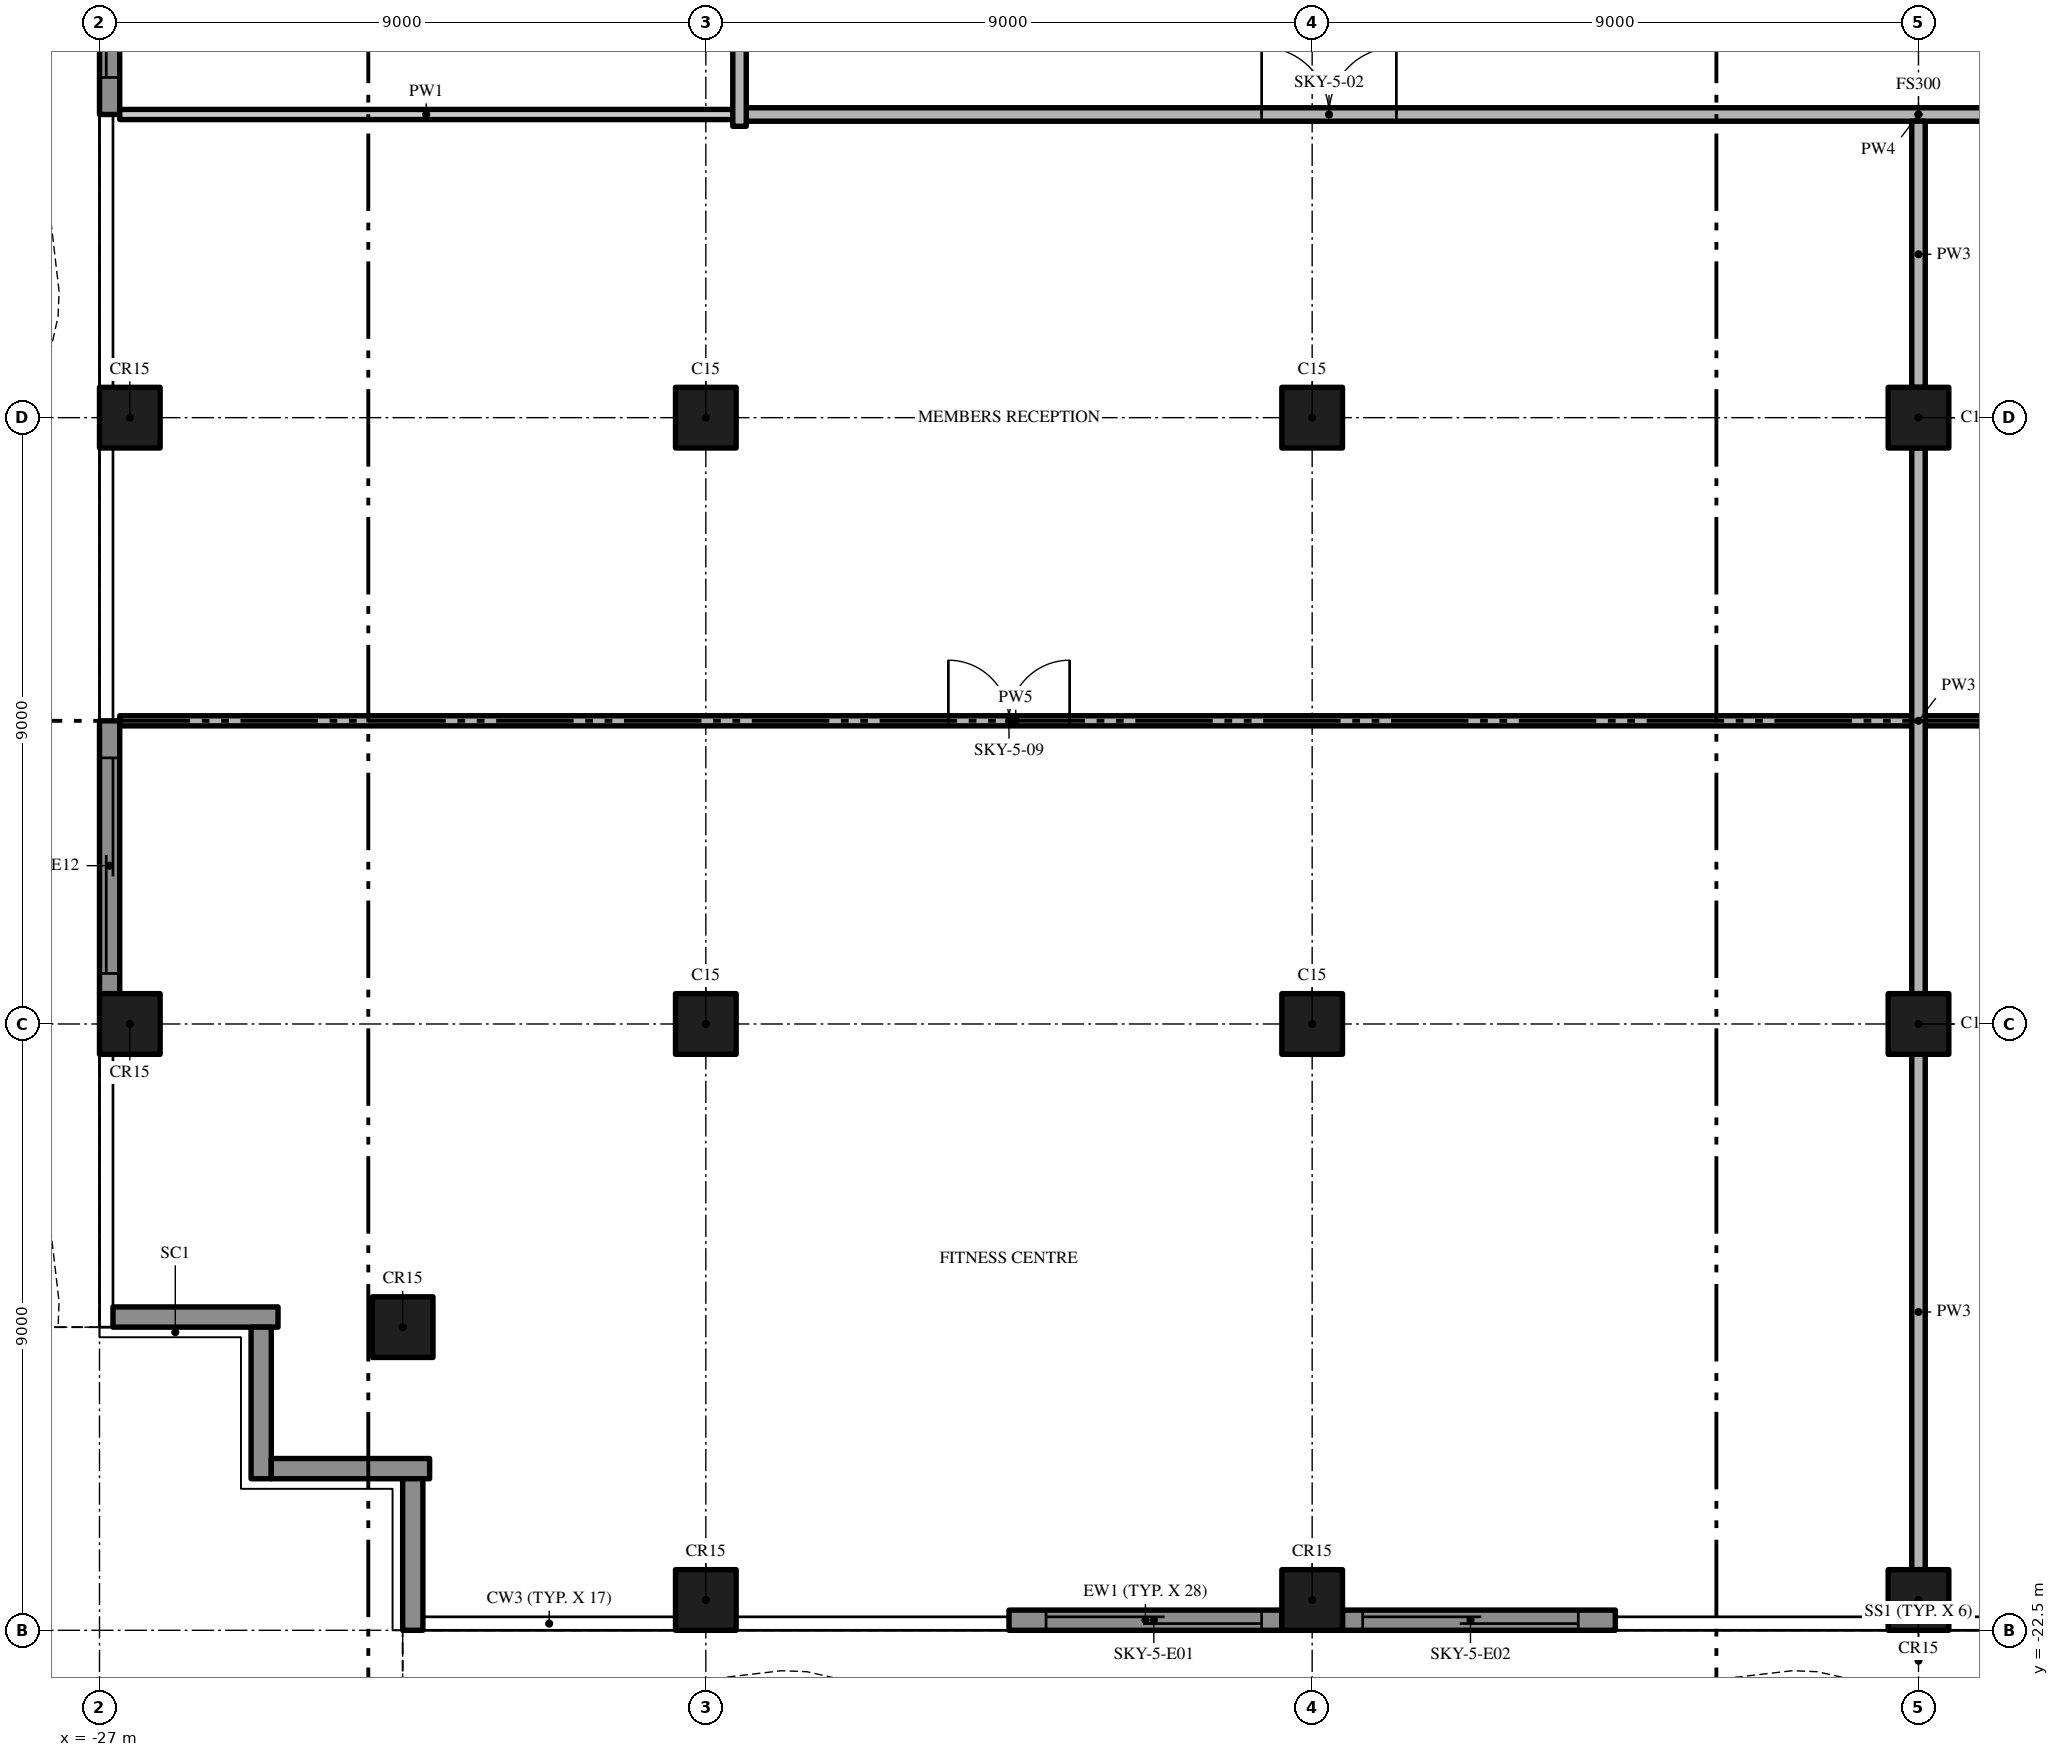
"""IFC4 building model, lengths in metres.
Left out: names, types, materials, properties, quantities, classifications, styles, units other than length and angle.
Written with IfcOpenShell. Run it as: python <this file> out.ifc"""

import sys

from ifc_helpers import new_model, si_unit, direction, frame, frame_2d, origin, origin_2d, place, context, subcontext, project, spatial, polyline, rectangle, outline, extrude, element, fill, save


model = new_model("IFC4")
c1 = context("Model", 3, precision=1e-05, world=origin(), true_north=direction((0.0, 1.0)))
c2 = subcontext(c1, "Body", "Model", "MODEL_VIEW")
j1 = project(units=[si_unit("LENGTHUNIT", "METRE"), si_unit("PLANEANGLEUNIT", "RADIAN")], contexts=[c1])
p1 = place(None, origin())
s1 = spatial("IfcSite", under=j1, at=p1, CompositionType="ELEMENT")
p2 = place(p1, origin())
s2 = spatial("IfcBuilding", under=s1, at=p2, CompositionType="ELEMENT")
p3 = place(p2, frame((0.0, 0.0, 284.4)))
s3 = spatial("IfcBuildingStorey", under=s2, at=p3, CompositionType="ELEMENT", Elevation=284.4)
for number, where, z_axis, x_axis in (
    (1, (-18.0, -13.5, 0.0), (0.0, 0.0, 1.0), (1.0, 0.0, 0.0)),
    (2, (-18.0, -22.05, 0.0), (0.0, 0.0, 1.0), (1.0, 0.0, 0.0)),
    (3, (-18.0, -4.5, 0.0), (0.0, 0.0, 1.0), (1.0, 0.0, 0.0)),
    (4, (-26.55, -13.5, 0.0), (0.0, 0.0, 1.0), (1.0, 0.0, 0.0)),
    (5, (-22.5, -18.0, 0.0), (0.0, 0.0, 1.0), (1.0, 0.0, 0.0)),
    (6, (-26.55, -4.5, 0.0), (0.0, 0.0, 1.0), (1.0, 0.0, 0.0)),
    (7, (-9.0, -13.5, 0.0), (0.0, 0.0, 1.0), (1.0, 0.0, 0.0)),
    (8, (-9.0, -22.05, 0.0), (0.0, 0.0, 1.0), (1.0, 0.0, 0.0)),
    (9, (-9.0, -4.5, 0.0), (0.0, 0.0, 1.0), (1.0, 0.0, 0.0)),
    (10, (0.0, -13.5, 0.0), (0.0, 0.0, 1.0), (1.0, 0.0, 0.0)),
    (11, (0.0, -22.05, 0.0), (0.0, 0.0, 1.0), (1.0, 0.0, 0.0)),
    (12, (0.0, -4.5, 0.0), (0.0, 0.0, 1.0), (1.0, 0.0, 0.0)),
):
    element("IfcColumn", number, at=place(p3, frame(where, z_axis=z_axis, x_axis=x_axis)), inside=s3, PredefinedType="COLUMN", context=c2, shape_type="SweptSolid", body=[
        extrude(rectangle(XDim=0.9, YDim=0.9, at=origin_2d()), origin(), (0.0, 0.0, 1.0), 4.7),
    ])
p4 = place(p3, frame((-9.45, -22.35, 0.0), z_axis=(0.0, 0.0, 1.0), x_axis=(-1.0, 0.0, 0.0)))
e13 = element("IfcWall", 13, at=p4, inside=s3, PredefinedType="SOLIDWALL", context=c2, shape_type="SweptSolid", body=[
    extrude(rectangle(XDim=4.05, YDim=0.3, at=frame_2d((2.025, 0.0))), origin(), (0.0, 0.0, 1.0), 4.7),
])
p5 = place(p4, frame((0.3, 0.0, 0.0)))
e14 = element("IfcOpeningElement", 14, at=p5, cuts=e13, PredefinedType="OPENING", context=c2, shape_type="SweptSolid", body=[
    extrude(rectangle(XDim=3.2, YDim=2.4, at=frame_2d((1.6, 1.2))), frame((0.0, 0.16, 0.0), z_axis=(0.0, -1.0, 0.0), x_axis=(1.0, 0.0, 0.0)), (0.0, 0.0, 1.0), 0.32),
])
p6 = place(p3, frame((-4.5, -22.35, 0.0), z_axis=(0.0, 0.0, 1.0), x_axis=(-1.0, 0.0, 0.0)))
e15 = element("IfcWall", 15, at=p6, inside=s3, PredefinedType="SOLIDWALL", context=c2, shape_type="SweptSolid", body=[
    extrude(rectangle(XDim=4.05, YDim=0.3, at=frame_2d((2.025, 0.0))), origin(), (0.0, 0.0, 1.0), 4.7),
])
p7 = place(p6, frame((0.55, 0.0, 0.0)))
e16 = element("IfcOpeningElement", 16, at=p7, cuts=e15, PredefinedType="OPENING", context=c2, shape_type="SweptSolid", body=[
    extrude(rectangle(XDim=3.2, YDim=2.4, at=frame_2d((1.6, 1.2))), frame((0.0, 0.16, 0.0), z_axis=(0.0, -1.0, 0.0), x_axis=(1.0, 0.0, 0.0)), (0.0, 0.0, 1.0), 0.32),
])
p8 = place(p3, frame((-26.85, 0.0, 0.0), z_axis=(0.0, 0.0, 1.0), x_axis=(0.0, 1.0, 0.0)))
e17 = element("IfcWall", 17, at=p8, inside=s3, PredefinedType="SOLIDWALL", context=c2, shape_type="SweptSolid", body=[
    extrude(rectangle(XDim=4.05, YDim=0.3, at=frame_2d((2.025, 0.0))), origin(), (0.0, 0.0, 1.0), 4.7),
])
p9 = place(p8, frame((0.55, 0.0, 0.0)))
e18 = element("IfcOpeningElement", 18, at=p9, cuts=e17, PredefinedType="OPENING", context=c2, shape_type="SweptSolid", body=[
    extrude(rectangle(XDim=3.2, YDim=2.4, at=frame_2d((1.6, 1.2))), frame((0.0, 0.16, 0.0), z_axis=(0.0, -1.0, 0.0), x_axis=(1.0, 0.0, 0.0)), (0.0, 0.0, 1.0), 0.32),
])
p10 = place(p3, frame((-26.85, -13.05, 0.0), z_axis=(0.0, 0.0, 1.0), x_axis=(0.0, 1.0, 0.0)))
e19 = element("IfcWall", 19, at=p10, inside=s3, PredefinedType="SOLIDWALL", context=c2, shape_type="SweptSolid", body=[
    extrude(rectangle(XDim=4.05, YDim=0.3, at=frame_2d((2.025, 0.0))), origin(), (0.0, 0.0, 1.0), 4.7),
])
p11 = place(p10, frame((0.3, 0.0, 0.0)))
e20 = element("IfcOpeningElement", 20, at=p11, cuts=e19, PredefinedType="OPENING", context=c2, shape_type="SweptSolid", body=[
    extrude(rectangle(XDim=3.2, YDim=2.4, at=frame_2d((1.6, 1.2))), frame((0.0, 0.16, 0.0), z_axis=(0.0, -1.0, 0.0), x_axis=(1.0, 0.0, 0.0)), (0.0, 0.0, 1.0), 0.32),
])
p12 = place(p3, frame((-24.35, -17.85, 0.0), z_axis=(0.0, 0.0, 1.0), x_axis=(-1.0, 0.0, 0.0)))
e21 = element("IfcWall", 21, at=p12, inside=s3, PredefinedType="SOLIDWALL", context=c2, shape_type="SweptSolid", body=[
    extrude(rectangle(XDim=2.45, YDim=0.3, at=frame_2d((1.225, 0.0))), origin(), (0.0, 0.0, 1.0), 4.7),
])
p13 = place(p3, frame((-24.6, -20.25, 0.0), z_axis=(0.0, 0.0, 1.0), x_axis=(0.0, 1.0, 0.0)))
e22 = element("IfcWall", 22, at=p13, inside=s3, PredefinedType="SOLIDWALL", context=c2, shape_type="SweptSolid", body=[
    extrude(rectangle(XDim=2.25, YDim=0.3, at=frame_2d((1.125, 0.0))), origin(), (0.0, 0.0, 1.0), 4.7),
])
p14 = place(p3, frame((-22.1, -20.1, 0.0), z_axis=(0.0, 0.0, 1.0), x_axis=(-1.0, 0.0, 0.0)))
e23 = element("IfcWall", 23, at=p14, inside=s3, PredefinedType="SOLIDWALL", context=c2, shape_type="SweptSolid", body=[
    extrude(rectangle(XDim=2.35, YDim=0.3, at=frame_2d((1.175, 0.0))), origin(), (0.0, 0.0, 1.0), 4.7),
])
p15 = place(p3, frame((-22.35, -22.5, 0.0), z_axis=(0.0, 0.0, 1.0), x_axis=(0.0, 1.0, 0.0)))
e24 = element("IfcWall", 24, at=p15, inside=s3, PredefinedType="SOLIDWALL", context=c2, shape_type="SweptSolid", body=[
    extrude(rectangle(XDim=2.25, YDim=0.3, at=frame_2d((1.125, 0.0))), origin(), (0.0, 0.0, 1.0), 4.7),
])
p16 = place(p3, origin())
e25 = element("IfcWall", 25, at=p16, inside=s3, PredefinedType="USERDEFINED", context=c2, shape_type="SweptSolid", body=[
    extrude(outline(polyline([(-22.5, -25.149), (-21.0, -24.488), (-19.5, -23.755), (-18.0, -23.231), (-16.875, -23.1), (-16.5, -23.115), (-15.0, -23.451), (-13.5, -24.112), (-12.0, -24.845), (-10.5, -25.369), (-9.375, -25.5), (-9.0, -25.485), (-7.5, -25.149), (-6.0, -24.488), (-4.5, -23.755), (-3.0, -23.231), (-1.875, -23.1), (-1.5, -23.115), (0.0, -23.451), (1.5, -24.112), (3.0, -24.845), (4.5, -25.369), (5.625, -25.5), (6.0, -25.485), (7.5, -25.149), (9.0, -24.488), (10.5, -23.755), (12.0, -23.231), (13.125, -23.1), (13.5, -23.115), (15.0, -23.451), (16.5, -24.112), (18.0, -24.845), (19.5, -25.369), (20.625, -25.5), (21.0, -25.485), (22.5, -25.149), (22.445, -24.905), (20.967, -25.236), (20.635, -25.249), (19.556, -25.124), (18.096, -24.614), (16.605, -23.885), (15.079, -23.213), (13.533, -22.866), (13.115, -22.849), (11.944, -22.986), (10.404, -23.524), (8.895, -24.261), (7.421, -24.91), (5.967, -25.236), (5.635, -25.249), (4.556, -25.124), (3.096, -24.614), (1.605, -23.885), (0.079, -23.213), (-1.467, -22.866), (-1.885, -22.849), (-3.056, -22.986), (-4.596, -23.524), (-6.105, -24.261), (-7.579, -24.91), (-9.033, -25.236), (-9.365, -25.249), (-10.444, -25.124), (-11.904, -24.614), (-13.395, -23.885), (-14.921, -23.213), (-16.467, -22.866), (-16.885, -22.849), (-18.056, -22.986), (-19.596, -23.524), (-21.105, -24.261), (-22.601, -24.92), (-22.5, -25.149)])), origin(), (0.0, 0.0, 1.0), 0.9),
])
p17 = place(p3, origin())
e26 = element("IfcWall", 26, at=p17, inside=s3, PredefinedType="USERDEFINED", context=c2, shape_type="SweptSolid", body=[
    extrude(outline(polyline([(-29.649, 18.0), (-28.988, 16.5), (-28.255, 15.0), (-27.731, 13.5), (-27.6, 12.375), (-27.615, 12.0), (-27.951, 10.5), (-28.612, 9.0), (-29.345, 7.5), (-29.869, 6.0), (-30.0, 4.875), (-29.985, 4.5), (-29.649, 3.0), (-28.988, 1.5), (-28.255, 0.0), (-27.731, -1.5), (-27.6, -2.625), (-27.615, -3.0), (-27.951, -4.5), (-28.612, -6.0), (-29.345, -7.5), (-29.869, -9.0), (-30.0, -10.125), (-29.985, -10.5), (-29.649, -12.0), (-28.988, -13.5), (-28.255, -15.0), (-27.731, -16.5), (-27.6, -17.625), (-27.615, -18.0), (-27.365, -18.01), (-27.349, -17.615), (-27.486, -16.444), (-28.024, -14.904), (-28.761, -13.395), (-29.41, -11.921), (-29.736, -10.467), (-29.749, -10.135), (-29.624, -9.056), (-29.114, -7.596), (-28.385, -6.105), (-27.713, -4.579), (-27.366, -3.033), (-27.349, -2.615), (-27.486, -1.444), (-28.024, 0.096), (-28.761, 1.605), (-29.41, 3.079), (-29.736, 4.533), (-29.749, 4.865), (-29.624, 5.944), (-29.114, 7.404), (-28.385, 8.895), (-27.713, 10.421), (-27.366, 11.967), (-27.349, 12.385), (-27.486, 13.556), (-28.024, 15.096), (-28.761, 16.605), (-29.42, 18.101), (-29.649, 18.0)])), origin(), (0.0, 0.0, 1.0), 0.9),
])
p18 = place(p3, frame((-26.7, -9.0, 0.0), z_axis=(0.0, 0.0, 1.0), x_axis=(1.0, 0.0, 0.0)))
e27 = element("IfcWall", 27, at=p18, inside=s3, PredefinedType="PARTITIONING", context=c2, shape_type="SweptSolid", body=[
    extrude(rectangle(XDim=26.6, YDim=0.15, at=frame_2d((13.3, 0.0))), origin(), (0.0, 0.0, 1.0), 4.7),
])
p19 = place(p18, frame((12.3, 0.0, 0.0)))
e28 = element("IfcOpeningElement", 28, at=p19, cuts=e27, PredefinedType="OPENING", context=c2, shape_type="SweptSolid", body=[
    extrude(rectangle(XDim=1.8, YDim=2.4, at=frame_2d((0.9, 1.2))), frame((0.0, 0.085, 0.0), z_axis=(0.0, -1.0, 0.0), x_axis=(1.0, 0.0, 0.0)), (0.0, 0.0, 1.0), 0.17),
])
p20 = place(p3, frame((0.1, -9.0, 0.0), z_axis=(0.0, 0.0, 1.0), x_axis=(1.0, 0.0, 0.0)))
e29 = element("IfcWall", 29, at=p20, inside=s3, PredefinedType="PARTITIONING", context=c2, shape_type="SweptSolid", body=[
    extrude(rectangle(XDim=26.6, YDim=0.15, at=frame_2d((13.3, 0.0))), origin(), (0.0, 0.0, 1.0), 4.7),
])
p21 = place(p20, frame((12.5, 0.0, 0.0)))
e30 = element("IfcOpeningElement", 30, at=p21, cuts=e29, PredefinedType="OPENING", context=c2, shape_type="SweptSolid", body=[
    extrude(rectangle(XDim=1.8, YDim=2.4, at=frame_2d((0.9, 1.2))), frame((0.0, 0.085, 0.0), z_axis=(0.0, -1.0, 0.0), x_axis=(1.0, 0.0, 0.0)), (0.0, 0.0, 1.0), 0.17),
])
p22 = place(p3, frame((-17.4, 0.0, 0.0), z_axis=(0.0, 0.0, 1.0), x_axis=(1.0, 0.0, 0.0)))
e31 = element("IfcWall", 31, at=p22, inside=s3, PredefinedType="PARTITIONING", context=c2, shape_type="SweptSolid", body=[
    extrude(rectangle(XDim=34.8, YDim=0.2, at=frame_2d((17.4, 0.0))), origin(), (0.0, 0.0, 1.0), 4.7),
])
p23 = place(p22, frame((7.65, 0.0, 0.0)))
e32 = element("IfcOpeningElement", 32, at=p23, cuts=e31, PredefinedType="OPENING", context=c2, shape_type="SweptSolid", body=[
    extrude(rectangle(XDim=2.0, YDim=2.4, at=frame_2d((1.0, 1.2))), frame((0.0, 0.11, 0.0), z_axis=(0.0, -1.0, 0.0), x_axis=(1.0, 0.0, 0.0)), (0.0, 0.0, 1.0), 0.22),
])
p24 = place(p22, frame((25.15, 0.0, 0.0)))
e33 = element("IfcOpeningElement", 33, at=p24, cuts=e31, PredefinedType="OPENING", context=c2, shape_type="SweptSolid", body=[
    extrude(rectangle(XDim=2.0, YDim=2.4, at=frame_2d((1.0, 1.2))), frame((0.0, 0.11, 0.0), z_axis=(0.0, -1.0, 0.0), x_axis=(1.0, 0.0, 0.0)), (0.0, 0.0, 1.0), 0.22),
])
p25 = place(p3, frame((-26.7, 0.0, 0.0), z_axis=(0.0, 0.0, 1.0), x_axis=(1.0, 0.0, 0.0)))
e34 = element("IfcWall", 34, at=p25, inside=s3, PredefinedType="PARTITIONING", context=c2, shape_type="SweptSolid", body=[
    extrude(rectangle(XDim=9.1, YDim=0.15, at=frame_2d((4.55, 0.0))), origin(), (0.0, 0.0, 1.0), 4.7),
])
p26 = place(p3, frame((-17.5, 4.05, 0.0), z_axis=(0.0, 0.0, 1.0), x_axis=(0.0, -1.0, 0.0)))
e35 = element("IfcWall", 35, at=p26, inside=s3, PredefinedType="PARTITIONING", context=c2, shape_type="SweptSolid", body=[
    extrude(rectangle(XDim=4.225, YDim=0.2, at=frame_2d((2.112, 0.0))), origin(), (0.0, 0.0, 1.0), 4.7),
])
p27 = place(p26, frame((0.9, 0.0, 0.0)))
e36 = element("IfcOpeningElement", 36, at=p27, cuts=e35, PredefinedType="OPENING", context=c2, shape_type="SweptSolid", body=[
    extrude(rectangle(XDim=1.8, YDim=2.4, at=frame_2d((0.9, 1.2))), frame((0.0, 0.11, 0.0), z_axis=(0.0, -1.0, 0.0), x_axis=(1.0, 0.0, 0.0)), (0.0, 0.0, 1.0), 0.22),
])
p28 = place(p3, frame((0.0, -21.6, 0.0), z_axis=(0.0, 0.0, 1.0), x_axis=(0.0, 1.0, 0.0)))
e37 = element("IfcWall", 37, at=p28, inside=s3, PredefinedType="PARTITIONING", context=c2, shape_type="SweptSolid", body=[
    extrude(rectangle(XDim=7.65, YDim=0.2, at=frame_2d((3.825, 0.0))), origin(), (0.0, 0.0, 1.0), 4.7),
])
p29 = place(p3, frame((0.0, -13.05, 0.0), z_axis=(0.0, 0.0, 1.0), x_axis=(0.0, 1.0, 0.0)))
e38 = element("IfcWall", 38, at=p29, inside=s3, PredefinedType="PARTITIONING", context=c2, shape_type="SweptSolid", body=[
    extrude(rectangle(XDim=8.1, YDim=0.2, at=frame_2d((4.05, 0.0))), origin(), (0.0, 0.0, 1.0), 4.7),
])
p30 = place(p3, frame((0.0, -4.05, 0.0), z_axis=(0.0, 0.0, 1.0), x_axis=(0.0, 1.0, 0.0)))
e39 = element("IfcWall", 39, at=p30, inside=s3, PredefinedType="PARTITIONING", context=c2, shape_type="SweptSolid", body=[
    extrude(rectangle(XDim=3.95, YDim=0.2, at=frame_2d((1.975, 0.0))), origin(), (0.0, 0.0, 1.0), 4.7),
])
p31 = place(p5, origin())
e40 = element("IfcDoor", 40, at=p31, inside=s3, OperationType="SINGLE_SWING_LEFT", PredefinedType="DOOR", context=c2, shape_type="SweptSolid", body=[
    extrude(rectangle(XDim=3.2, YDim=2.4, at=frame_2d((1.6, 1.2))), frame((0.0, 0.025, 0.0), z_axis=(0.0, -1.0, 0.0), x_axis=(1.0, 0.0, 0.0)), (0.0, 0.0, 1.0), 0.05),
])
fill(e14, e40)
p32 = place(p7, origin())
e41 = element("IfcDoor", 41, at=p32, inside=s3, OperationType="SINGLE_SWING_LEFT", PredefinedType="DOOR", context=c2, shape_type="SweptSolid", body=[
    extrude(rectangle(XDim=3.2, YDim=2.4, at=frame_2d((1.6, 1.2))), frame((0.0, 0.025, 0.0), z_axis=(0.0, -1.0, 0.0), x_axis=(1.0, 0.0, 0.0)), (0.0, 0.0, 1.0), 0.05),
])
fill(e16, e41)
p33 = place(p9, origin())
e42 = element("IfcDoor", 42, at=p33, inside=s3, OperationType="SINGLE_SWING_LEFT", PredefinedType="DOOR", context=c2, shape_type="SweptSolid", body=[
    extrude(rectangle(XDim=3.2, YDim=2.4, at=frame_2d((1.6, 1.2))), frame((0.0, 0.025, 0.0), z_axis=(0.0, -1.0, 0.0), x_axis=(1.0, 0.0, 0.0)), (0.0, 0.0, 1.0), 0.05),
])
fill(e18, e42)
p34 = place(p11, origin())
e43 = element("IfcDoor", 43, at=p34, inside=s3, OperationType="SINGLE_SWING_LEFT", PredefinedType="DOOR", context=c2, shape_type="SweptSolid", body=[
    extrude(rectangle(XDim=3.2, YDim=2.4, at=frame_2d((1.6, 1.2))), frame((0.0, 0.025, 0.0), z_axis=(0.0, -1.0, 0.0), x_axis=(1.0, 0.0, 0.0)), (0.0, 0.0, 1.0), 0.05),
])
fill(e20, e43)
p35 = place(p23, origin())
e44 = element("IfcDoor", 44, at=p35, inside=s3, OperationType="DOUBLE_DOOR_SINGLE_SWING", PredefinedType="DOOR", context=c2, shape_type="SweptSolid", body=[
    extrude(rectangle(XDim=2.0, YDim=2.4, at=frame_2d((1.0, 1.2))), frame((0.0, 0.025, 0.0), z_axis=(0.0, -1.0, 0.0), x_axis=(1.0, 0.0, 0.0)), (0.0, 0.0, 1.0), 0.05),
])
fill(e32, e44)
p36 = place(p19, origin())
e45 = element("IfcDoor", 45, at=p36, inside=s3, OperationType="DOUBLE_DOOR_SINGLE_SWING", PredefinedType="DOOR", context=c2, shape_type="SweptSolid", body=[
    extrude(rectangle(XDim=1.8, YDim=2.4, at=frame_2d((0.9, 1.2))), frame((0.0, 0.025, 0.0), z_axis=(0.0, -1.0, 0.0), x_axis=(1.0, 0.0, 0.0)), (0.0, 0.0, 1.0), 0.05),
])
fill(e28, e45)
save(model, sys.argv[1])
